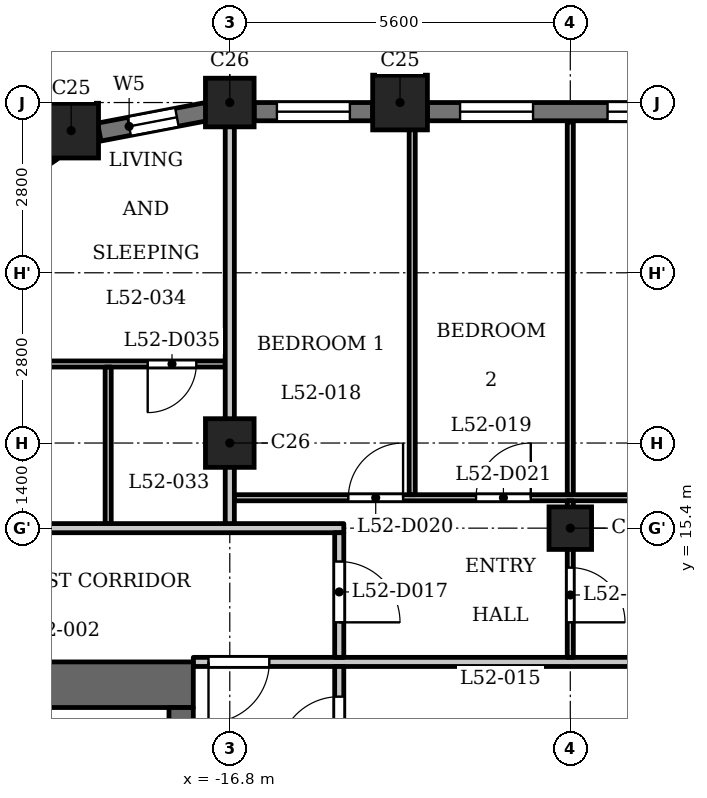
"""IFC4 building model, lengths in metres.
Left out: names, types, materials, properties, quantities, classifications, styles, units other than length and angle.
Written with IfcOpenShell. Run it as: python <this file> out.ifc"""

import sys

from ifc_helpers import new_model, si_unit, direction, frame, frame_2d, origin, origin_2d, place, context, subcontext, project, spatial, rectangle, extrude, element, fill, save


model = new_model("IFC4")
c1 = context("Model", 3, precision=1e-05, world=origin(), true_north=direction((0.0, 1.0)))
c2 = subcontext(c1, "Body", "Model", "MODEL_VIEW")
j1 = project(units=[si_unit("LENGTHUNIT", "METRE"), si_unit("PLANEANGLEUNIT", "RADIAN")], contexts=[c1])
p1 = place(None, origin())
s1 = spatial("IfcSite", under=j1, at=p1, CompositionType="ELEMENT")
p2 = place(p1, origin())
s2 = spatial("IfcBuilding", under=s1, at=p2, CompositionType="ELEMENT")
p3 = place(p2, frame((0.0, 0.0, 202.9)))
s3 = spatial("IfcBuildingStorey", under=s2, at=p3, CompositionType="ELEMENT", Elevation=202.9)
for number, where, z_axis, x_axis in (
    (1, (-14.0, 22.4, 0.0), (0.0, 0.0, 1.0), (1.0, 0.0, 0.0)),
    (2, (-19.409, 21.938, 0.0), (0.0, 0.0, 1.0), (1.0, 0.0, 0.0)),
):
    element("IfcColumn", number, at=place(p3, frame(where, z_axis=z_axis, x_axis=x_axis)), inside=s3, PredefinedType="COLUMN", context=c2, shape_type="SweptSolid", body=[
        extrude(rectangle(XDim=0.9, YDim=0.9, at=origin_2d()), origin(), (0.0, 0.0, 1.0), 3.5),
    ])
for number, where, z_axis, x_axis in (
    (3, (-16.8, 16.8, 0.0), (0.0, 0.0, 1.0), (1.0, 0.0, 0.0)),
    (4, (-16.8, 22.4, 0.0), (0.0, 0.0, 1.0), (1.0, 0.0, 0.0)),
):
    element("IfcColumn", number, at=place(p3, frame(where, z_axis=z_axis, x_axis=x_axis)), inside=s3, PredefinedType="COLUMN", context=c2, shape_type="SweptSolid", body=[
        extrude(rectangle(XDim=0.8, YDim=0.8, at=origin_2d()), origin(), (0.0, 0.0, 1.0), 3.5),
    ])
p4 = place(p3, frame((-11.2, 15.4, 0.0), z_axis=(0.0, 0.0, 1.0), x_axis=(1.0, 0.0, 0.0)))
e5 = element("IfcColumn", 5, at=p4, inside=s3, PredefinedType="COLUMN", context=c2, shape_type="SweptSolid", body=[
    extrude(rectangle(XDim=0.7, YDim=0.7, at=origin_2d()), origin(), (0.0, 0.0, 1.0), 3.5),
])
p5 = place(p3, frame((-8.85, 22.25, 0.0), z_axis=(0.0, 0.0, 1.0), x_axis=(-1.0, 0.0, 0.0)))
e6 = element("IfcWall", 6, at=p5, inside=s3, PredefinedType="SOLIDWALL", context=c2, shape_type="SweptSolid", body=[
    extrude(rectangle(XDim=4.7, YDim=0.3, at=frame_2d((2.35, 0.0))), origin(), (0.0, 0.0, 1.0), 2.5),
])
p6 = place(p5, frame((0.538, 0.0, 0.6)))
e7 = element("IfcOpeningElement", 7, at=p6, cuts=e6, PredefinedType="OPENING", context=c2, shape_type="SweptSolid", body=[
    extrude(rectangle(XDim=1.2, YDim=1.55, at=frame_2d((0.6, 0.775))), frame((0.0, 0.16, 0.0), z_axis=(0.0, -1.0, 0.0), x_axis=(1.0, 0.0, 0.0)), (0.0, 0.0, 1.0), 0.32),
])
p7 = place(p5, frame((2.962, 0.0, 0.6)))
e8 = element("IfcOpeningElement", 8, at=p7, cuts=e6, PredefinedType="OPENING", context=c2, shape_type="SweptSolid", body=[
    extrude(rectangle(XDim=1.2, YDim=1.55, at=frame_2d((0.6, 0.775))), frame((0.0, 0.16, 0.0), z_axis=(0.0, -1.0, 0.0), x_axis=(1.0, 0.0, 0.0)), (0.0, 0.0, 1.0), 0.32),
])
p8 = place(p3, frame((-14.45, 22.25, 0.0), z_axis=(0.0, 0.0, 1.0), x_axis=(-1.0, 0.0, 0.0)))
e9 = element("IfcWall", 9, at=p8, inside=s3, PredefinedType="SOLIDWALL", context=c2, shape_type="SweptSolid", body=[
    extrude(rectangle(XDim=1.95, YDim=0.3, at=frame_2d((0.975, 0.0))), origin(), (0.0, 0.0, 1.0), 2.5),
])
p9 = place(p8, frame((0.375, 0.0, 0.6)))
e10 = element("IfcOpeningElement", 10, at=p9, cuts=e9, PredefinedType="OPENING", context=c2, shape_type="SweptSolid", body=[
    extrude(rectangle(XDim=1.2, YDim=1.55, at=frame_2d((0.6, 0.775))), frame((0.0, 0.16, 0.0), z_axis=(0.0, -1.0, 0.0), x_axis=(1.0, 0.0, 0.0)), (0.0, 0.0, 1.0), 0.32),
])
p10 = place(p3, frame((-17.179, 22.251, 0.0), z_axis=(0.0, 0.0, 1.0), x_axis=(-0.98230529033, -0.187286722942, 0.0)))
e11 = element("IfcWall", 11, at=p10, inside=s3, PredefinedType="SOLIDWALL", context=c2, shape_type="SweptSolid", body=[
    extrude(rectangle(XDim=1.799, YDim=0.3, at=frame_2d((0.899, 0.0))), origin(), (0.0, 0.0, 1.0), 2.5),
])
p11 = place(p10, frame((0.5, 0.0, 0.6)))
e12 = element("IfcOpeningElement", 12, at=p11, cuts=e11, PredefinedType="OPENING", context=c2, shape_type="SweptSolid", body=[
    extrude(rectangle(XDim=0.8, YDim=1.55, at=frame_2d((0.4, 0.775))), frame((0.0, 0.16, 0.0), z_axis=(0.0, -1.0, 0.0), x_axis=(1.0, 0.0, 0.0)), (0.0, 0.0, 1.0), 0.32),
])
p12 = place(p3, frame((-19.719, 21.594, 0.0), z_axis=(0.0, 0.0, 1.0), x_axis=(-0.827067282455, -0.562102935673, 0.0)))
e13 = element("IfcWall", 13, at=p12, inside=s3, PredefinedType="SOLIDWALL", context=c2, shape_type="SweptSolid", body=[
    extrude(rectangle(XDim=1.806, YDim=0.3, at=frame_2d((0.903, 0.0))), origin(), (0.0, 0.0, 1.0), 2.5),
])
p13 = place(p12, frame((0.503, 0.0, 0.6)))
e14 = element("IfcOpeningElement", 14, at=p13, cuts=e13, PredefinedType="OPENING", context=c2, shape_type="SweptSolid", body=[
    extrude(rectangle(XDim=0.8, YDim=1.55, at=frame_2d((0.4, 0.775))), frame((0.0, 0.16, 0.0), z_axis=(0.0, -1.0, 0.0), x_axis=(1.0, 0.0, 0.0)), (0.0, 0.0, 1.0), 0.32),
])
p14 = place(p3, frame((-17.4, 12.825, 0.0), z_axis=(0.0, 0.0, 1.0), x_axis=(-1.0, 0.0, 0.0)))
e15 = element("IfcWall", 15, at=p14, inside=s3, PredefinedType="SHEAR", context=c2, shape_type="SweptSolid", body=[
    extrude(rectangle(XDim=7.6, YDim=0.75, at=frame_2d((3.8, 0.0))), origin(), (0.0, 0.0, 1.0), 3.2),
])
p15 = place(p3, frame((-17.6, -12.45, 0.0), z_axis=(0.0, 0.0, 1.0), x_axis=(0.0, 1.0, 0.0)))
e16 = element("IfcWall", 16, at=p15, inside=s3, PredefinedType="SHEAR", context=c2, shape_type="SweptSolid", body=[
    extrude(rectangle(XDim=24.9, YDim=0.4, at=frame_2d((12.45, 0.0))), origin(), (0.0, 0.0, 1.0), 3.2),
])
p16 = place(p15, frame((8.65, 0.0, 0.0)))
e17 = element("IfcOpeningElement", 17, at=p16, cuts=e16, PredefinedType="OPENING", context=c2, shape_type="SweptSolid", body=[
    extrude(rectangle(XDim=0.9, YDim=2.1, at=frame_2d((0.45, 1.05))), frame((0.0, 0.21, 0.0), z_axis=(0.0, -1.0, 0.0), x_axis=(1.0, 0.0, 0.0)), (0.0, 0.0, 1.0), 0.42),
])
p17 = place(p15, frame((15.6, 0.0, 0.0)))
e18 = element("IfcOpeningElement", 18, at=p17, cuts=e16, PredefinedType="OPENING", context=c2, shape_type="SweptSolid", body=[
    extrude(rectangle(XDim=1.1, YDim=2.1, at=frame_2d((0.55, 1.05))), frame((0.0, 0.21, 0.0), z_axis=(0.0, -1.0, 0.0), x_axis=(1.0, 0.0, 0.0)), (0.0, 0.0, 1.0), 0.42),
])
p18 = place(p15, frame((18.0, 0.0, 0.0)))
e19 = element("IfcOpeningElement", 19, at=p18, cuts=e16, PredefinedType="OPENING", context=c2, shape_type="SweptSolid", body=[
    extrude(rectangle(XDim=1.1, YDim=2.1, at=frame_2d((0.55, 1.05))), frame((0.0, 0.21, 0.0), z_axis=(0.0, -1.0, 0.0), x_axis=(1.0, 0.0, 0.0)), (0.0, 0.0, 1.0), 0.42),
])
p19 = place(p15, frame((23.025, 0.0, 0.0)))
e20 = element("IfcOpeningElement", 20, at=p19, cuts=e16, PredefinedType="OPENING", context=c2, shape_type="SweptSolid", body=[
    extrude(rectangle(XDim=1.1, YDim=2.1, at=frame_2d((0.55, 1.05))), frame((0.0, 0.21, 0.0), z_axis=(0.0, -1.0, 0.0), x_axis=(1.0, 0.0, 0.0)), (0.0, 0.0, 1.0), 0.42),
])
p20 = place(p15, frame((0.775, 0.0, 0.0)))
e21 = element("IfcOpeningElement", 21, at=p20, cuts=e16, PredefinedType="OPENING", context=c2, shape_type="SweptSolid", body=[
    extrude(rectangle(XDim=1.1, YDim=2.1, at=frame_2d((0.55, 1.05))), frame((0.0, 0.21, 0.0), z_axis=(0.0, -1.0, 0.0), x_axis=(1.0, 0.0, 0.0)), (0.0, 0.0, 1.0), 0.42),
])
p21 = place(p15, frame((12.925, 0.0, 0.0)))
e22 = element("IfcOpeningElement", 22, at=p21, cuts=e16, PredefinedType="OPENING", context=c2, shape_type="SweptSolid", body=[
    extrude(rectangle(XDim=1.8, YDim=2.1, at=frame_2d((0.9, 1.05))), frame((0.0, 0.21, 0.0), z_axis=(0.0, -1.0, 0.0), x_axis=(1.0, 0.0, 0.0)), (0.0, 0.0, 1.0), 0.42),
])
p22 = place(p3, frame((-17.4, 13.2, 0.0), z_axis=(0.0, 0.0, 1.0), x_axis=(1.0, 0.0, 0.0)))
e23 = element("IfcWall", 23, at=p22, inside=s3, PredefinedType="PARTITIONING", context=c2, shape_type="SweptSolid", body=[
    extrude(rectangle(XDim=34.8, YDim=0.15, at=frame_2d((17.4, 0.0))), origin(), (0.0, 0.0, 1.0), 3.2),
])
p23 = place(p22, frame((0.25, 0.0, 0.0)))
e24 = element("IfcOpeningElement", 24, at=p23, cuts=e23, PredefinedType="OPENING", context=c2, shape_type="SweptSolid", body=[
    extrude(rectangle(XDim=1.0, YDim=2.1, at=frame_2d((0.5, 1.05))), frame((0.0, 0.085, 0.0), z_axis=(0.0, -1.0, 0.0), x_axis=(1.0, 0.0, 0.0)), (0.0, 0.0, 1.0), 0.17),
])
p24 = place(p22, frame((33.65, 0.0, 0.0)))
e25 = element("IfcOpeningElement", 25, at=p24, cuts=e23, PredefinedType="OPENING", context=c2, shape_type="SweptSolid", body=[
    extrude(rectangle(XDim=1.0, YDim=2.1, at=frame_2d((0.5, 1.05))), frame((0.0, 0.085, 0.0), z_axis=(0.0, -1.0, 0.0), x_axis=(1.0, 0.0, 0.0)), (0.0, 0.0, 1.0), 0.17),
])
p25 = place(p3, frame((-24.684, 15.4, 0.0), z_axis=(0.0, 0.0, 1.0), x_axis=(1.0, 0.0, 0.0)))
e26 = element("IfcWall", 26, at=p25, inside=s3, PredefinedType="PARTITIONING", context=c2, shape_type="SweptSolid", body=[
    extrude(rectangle(XDim=9.759, YDim=0.15, at=frame_2d((4.879, 0.0))), origin(), (0.0, 0.0, 1.0), 3.2),
])
p26 = place(p25, frame((0.984, 0.0, 0.0)))
e27 = element("IfcOpeningElement", 27, at=p26, cuts=e26, PredefinedType="OPENING", context=c2, shape_type="SweptSolid", body=[
    extrude(rectangle(XDim=1.0, YDim=2.1, at=frame_2d((0.5, 1.05))), frame((0.0, 0.085, 0.0), z_axis=(0.0, -1.0, 0.0), x_axis=(1.0, 0.0, 0.0)), (0.0, 0.0, 1.0), 0.17),
])
p27 = place(p3, frame((-16.725, 15.9, 0.0), z_axis=(0.0, 0.0, 1.0), x_axis=(1.0, 0.0, 0.0)))
e28 = element("IfcWall", 28, at=p27, inside=s3, PredefinedType="PARTITIONING", context=c2, shape_type="SweptSolid", body=[
    extrude(rectangle(XDim=33.45, YDim=0.1, at=frame_2d((16.725, 0.0))), origin(), (0.0, 0.0, 1.0), 3.2),
])
p28 = place(p27, frame((1.875, 0.0, 0.0)))
e29 = element("IfcOpeningElement", 29, at=p28, cuts=e28, PredefinedType="OPENING", context=c2, shape_type="SweptSolid", body=[
    extrude(rectangle(XDim=0.9, YDim=2.1, at=frame_2d((0.45, 1.05))), frame((0.0, 0.06, 0.0), z_axis=(0.0, -1.0, 0.0), x_axis=(1.0, 0.0, 0.0)), (0.0, 0.0, 1.0), 0.12),
])
p29 = place(p27, frame((3.975, 0.0, 0.0)))
e30 = element("IfcOpeningElement", 30, at=p29, cuts=e28, PredefinedType="OPENING", context=c2, shape_type="SweptSolid", body=[
    extrude(rectangle(XDim=0.9, YDim=2.1, at=frame_2d((0.45, 1.05))), frame((0.0, 0.06, 0.0), z_axis=(0.0, -1.0, 0.0), x_axis=(1.0, 0.0, 0.0)), (0.0, 0.0, 1.0), 0.12),
])
p30 = place(p27, frame((6.825, 0.0, 0.0)))
e31 = element("IfcOpeningElement", 31, at=p30, cuts=e28, PredefinedType="OPENING", context=c2, shape_type="SweptSolid", body=[
    extrude(rectangle(XDim=0.9, YDim=2.1, at=frame_2d((0.45, 1.05))), frame((0.0, 0.06, 0.0), z_axis=(0.0, -1.0, 0.0), x_axis=(1.0, 0.0, 0.0)), (0.0, 0.0, 1.0), 0.12),
])
p31 = place(p27, frame((28.975, 0.0, 0.0)))
e32 = element("IfcOpeningElement", 32, at=p31, cuts=e28, PredefinedType="OPENING", context=c2, shape_type="SweptSolid", body=[
    extrude(rectangle(XDim=0.9, YDim=2.1, at=frame_2d((0.45, 1.05))), frame((0.0, 0.06, 0.0), z_axis=(0.0, -1.0, 0.0), x_axis=(1.0, 0.0, 0.0)), (0.0, 0.0, 1.0), 0.12),
])
p32 = place(p27, frame((30.725, 0.0, 0.0)))
e33 = element("IfcOpeningElement", 33, at=p32, cuts=e28, PredefinedType="OPENING", context=c2, shape_type="SweptSolid", body=[
    extrude(rectangle(XDim=0.9, YDim=2.1, at=frame_2d((0.45, 1.05))), frame((0.0, 0.06, 0.0), z_axis=(0.0, -1.0, 0.0), x_axis=(1.0, 0.0, 0.0)), (0.0, 0.0, 1.0), 0.12),
])
p33 = place(p27, frame((25.625, 0.0, 0.0)))
e34 = element("IfcOpeningElement", 34, at=p33, cuts=e28, PredefinedType="OPENING", context=c2, shape_type="SweptSolid", body=[
    extrude(rectangle(XDim=0.9, YDim=2.1, at=frame_2d((0.45, 1.05))), frame((0.0, 0.06, 0.0), z_axis=(0.0, -1.0, 0.0), x_axis=(1.0, 0.0, 0.0)), (0.0, 0.0, 1.0), 0.12),
])
p34 = place(p3, frame((-23.64, 18.1, 0.0), z_axis=(0.0, 0.0, 1.0), x_axis=(1.0, 0.0, 0.0)))
e35 = element("IfcWall", 35, at=p34, inside=s3, PredefinedType="PARTITIONING", context=c2, shape_type="SweptSolid", body=[
    extrude(rectangle(XDim=6.765, YDim=0.1, at=frame_2d((3.382, 0.0))), origin(), (0.0, 0.0, 1.0), 3.2),
])
p35 = place(p34, frame((5.49, 0.0, 0.0)))
e36 = element("IfcOpeningElement", 36, at=p35, cuts=e35, PredefinedType="OPENING", context=c2, shape_type="SweptSolid", body=[
    extrude(rectangle(XDim=0.8, YDim=2.1, at=frame_2d((0.4, 1.05))), frame((0.0, 0.06, 0.0), z_axis=(0.0, -1.0, 0.0), x_axis=(1.0, 0.0, 0.0)), (0.0, 0.0, 1.0), 0.12),
])
p36 = place(p34, frame((1.29, 0.0, 0.0)))
e37 = element("IfcOpeningElement", 37, at=p36, cuts=e35, PredefinedType="OPENING", context=c2, shape_type="SweptSolid", body=[
    extrude(rectangle(XDim=0.9, YDim=2.1, at=frame_2d((0.45, 1.05))), frame((0.0, 0.06, 0.0), z_axis=(0.0, -1.0, 0.0), x_axis=(1.0, 0.0, 0.0)), (0.0, 0.0, 1.0), 0.12),
])
p37 = place(p3, frame((-18.8, 15.475, 0.0), z_axis=(0.0, 0.0, 1.0), x_axis=(0.0, 1.0, 0.0)))
e38 = element("IfcWall", 38, at=p37, inside=s3, PredefinedType="PARTITIONING", context=c2, shape_type="SweptSolid", body=[
    extrude(rectangle(XDim=2.575, YDim=0.1, at=frame_2d((1.288, 0.0))), origin(), (0.0, 0.0, 1.0), 3.2),
])
p38 = place(p3, frame((-16.8, 15.475, 0.0), z_axis=(0.0, 0.0, 1.0), x_axis=(0.0, 1.0, 0.0)))
e39 = element("IfcWall", 39, at=p38, inside=s3, PredefinedType="PARTITIONING", context=c2, shape_type="SweptSolid", body=[
    extrude(rectangle(XDim=6.835, YDim=0.15, at=frame_2d((3.417, 0.0))), origin(), (0.0, 0.0, 1.0), 2.55),
])
p39 = place(p3, frame((-15.0, 6.769, 0.0), z_axis=(0.0, 0.0, 1.0), x_axis=(0.0, 1.0, 0.0)))
e40 = element("IfcWall", 40, at=p39, inside=s3, PredefinedType="PARTITIONING", context=c2, shape_type="SweptSolid", body=[
    extrude(rectangle(XDim=6.356, YDim=0.15, at=frame_2d((3.178, 0.0))), origin(), (0.0, 0.0, 1.0), 3.2),
])
p40 = place(p39, frame((4.86, 0.0, 0.0)))
e41 = element("IfcOpeningElement", 41, at=p40, cuts=e40, PredefinedType="OPENING", context=c2, shape_type="SweptSolid", body=[
    extrude(rectangle(XDim=1.0, YDim=2.1, at=frame_2d((0.5, 1.05))), frame((0.0, 0.085, 0.0), z_axis=(0.0, -1.0, 0.0), x_axis=(1.0, 0.0, 0.0)), (0.0, 0.0, 1.0), 0.17),
])
p41 = place(p3, frame((-15.0, 13.275, 0.0), z_axis=(0.0, 0.0, 1.0), x_axis=(0.0, 1.0, 0.0)))
e42 = element("IfcWall", 42, at=p41, inside=s3, PredefinedType="PARTITIONING", context=c2, shape_type="SweptSolid", body=[
    extrude(rectangle(XDim=2.05, YDim=0.15, at=frame_2d((1.025, 0.0))), origin(), (0.0, 0.0, 1.0), 3.2),
])
p42 = place(p41, frame((0.576, 0.0, 0.0)))
e43 = element("IfcOpeningElement", 43, at=p42, cuts=e42, PredefinedType="OPENING", context=c2, shape_type="SweptSolid", body=[
    extrude(rectangle(XDim=1.0, YDim=2.1, at=frame_2d((0.5, 1.05))), frame((0.0, 0.085, 0.0), z_axis=(0.0, -1.0, 0.0), x_axis=(1.0, 0.0, 0.0)), (0.0, 0.0, 1.0), 0.17),
])
p43 = place(p3, frame((-13.8, 15.95, 0.0), z_axis=(0.0, 0.0, 1.0), x_axis=(0.0, 1.0, 0.0)))
e44 = element("IfcWall", 44, at=p43, inside=s3, PredefinedType="PARTITIONING", context=c2, shape_type="SweptSolid", body=[
    extrude(rectangle(XDim=6.88, YDim=0.1, at=frame_2d((3.44, 0.0))), origin(), (0.0, 0.0, 1.0), 3.2),
])
p44 = place(p3, frame((-11.2, 13.275, 0.0), z_axis=(0.0, 0.0, 1.0), x_axis=(0.0, 1.0, 0.0)))
e45 = element("IfcWall", 45, at=p44, inside=s3, PredefinedType="PARTITIONING", context=c2, shape_type="SweptSolid", body=[
    extrude(rectangle(XDim=2.575, YDim=0.1, at=frame_2d((1.288, 0.0))), origin(), (0.0, 0.0, 1.0), 3.2),
])
p45 = place(p44, frame((0.576, 0.0, 0.0)))
e46 = element("IfcOpeningElement", 46, at=p45, cuts=e45, PredefinedType="OPENING", context=c2, shape_type="SweptSolid", body=[
    extrude(rectangle(XDim=0.9, YDim=2.1, at=frame_2d((0.45, 1.05))), frame((0.0, 0.06, 0.0), z_axis=(0.0, -1.0, 0.0), x_axis=(1.0, 0.0, 0.0)), (0.0, 0.0, 1.0), 0.12),
])
p46 = place(p3, frame((-11.2, 15.95, 0.0), z_axis=(0.0, 0.0, 1.0), x_axis=(0.0, 1.0, 0.0)))
e47 = element("IfcWall", 47, at=p46, inside=s3, PredefinedType="PARTITIONING", context=c2, shape_type="SweptSolid", body=[
    extrude(rectangle(XDim=6.13, YDim=0.1, at=frame_2d((3.065, 0.0))), origin(), (0.0, 0.0, 1.0), 3.2),
])
p47 = place(p40, origin())
e48 = element("IfcDoor", 48, at=p47, inside=s3, OperationType="SINGLE_SWING_RIGHT", PredefinedType="DOOR", context=c2, shape_type="SweptSolid", body=[
    extrude(rectangle(XDim=1.0, YDim=2.1, at=frame_2d((0.5, 1.05))), frame((0.0, 0.025, 0.0), z_axis=(0.0, -1.0, 0.0), x_axis=(1.0, 0.0, 0.0)), (0.0, 0.0, 1.0), 0.05),
])
fill(e41, e48)
p48 = place(p23, origin())
e49 = element("IfcDoor", 49, at=p48, inside=s3, OperationType="SINGLE_SWING_LEFT", PredefinedType="DOOR", context=c2, shape_type="SweptSolid", body=[
    extrude(rectangle(XDim=1.0, YDim=2.1, at=frame_2d((0.5, 1.05))), frame((0.0, 0.025, 0.0), z_axis=(0.0, -1.0, 0.0), x_axis=(1.0, 0.0, 0.0)), (0.0, 0.0, 1.0), 0.05),
])
fill(e24, e49)
p49 = place(p42, origin())
e50 = element("IfcDoor", 50, at=p49, inside=s3, OperationType="SINGLE_SWING_LEFT", PredefinedType="DOOR", context=c2, shape_type="SweptSolid", body=[
    extrude(rectangle(XDim=1.0, YDim=2.1, at=frame_2d((0.5, 1.05))), frame((0.0, 0.025, 0.0), z_axis=(0.0, -1.0, 0.0), x_axis=(1.0, 0.0, 0.0)), (0.0, 0.0, 1.0), 0.05),
])
fill(e43, e50)
p50 = place(p45, origin())
e51 = element("IfcDoor", 51, at=p50, inside=s3, OperationType="SINGLE_SWING_LEFT", PredefinedType="DOOR", context=c2, shape_type="SweptSolid", body=[
    extrude(rectangle(XDim=0.9, YDim=2.1, at=frame_2d((0.45, 1.05))), frame((0.0, 0.025, 0.0), z_axis=(0.0, -1.0, 0.0), x_axis=(1.0, 0.0, 0.0)), (0.0, 0.0, 1.0), 0.05),
])
fill(e46, e51)
p51 = place(p28, origin())
e52 = element("IfcDoor", 52, at=p51, inside=s3, OperationType="SINGLE_SWING_LEFT", PredefinedType="DOOR", context=c2, shape_type="SweptSolid", body=[
    extrude(rectangle(XDim=0.9, YDim=2.1, at=frame_2d((0.45, 1.05))), frame((0.0, 0.025, 0.0), z_axis=(0.0, -1.0, 0.0), x_axis=(1.0, 0.0, 0.0)), (0.0, 0.0, 1.0), 0.05),
])
fill(e29, e52)
p52 = place(p29, origin())
e53 = element("IfcDoor", 53, at=p52, inside=s3, OperationType="SINGLE_SWING_LEFT", PredefinedType="DOOR", context=c2, shape_type="SweptSolid", body=[
    extrude(rectangle(XDim=0.9, YDim=2.1, at=frame_2d((0.45, 1.05))), frame((0.0, 0.025, 0.0), z_axis=(0.0, -1.0, 0.0), x_axis=(1.0, 0.0, 0.0)), (0.0, 0.0, 1.0), 0.05),
])
fill(e30, e53)
p53 = place(p35, origin())
e54 = element("IfcDoor", 54, at=p53, inside=s3, OperationType="SINGLE_SWING_LEFT", PredefinedType="DOOR", context=c2, shape_type="SweptSolid", body=[
    extrude(rectangle(XDim=0.8, YDim=2.1, at=frame_2d((0.4, 1.05))), frame((0.0, 0.025, 0.0), z_axis=(0.0, -1.0, 0.0), x_axis=(1.0, 0.0, 0.0)), (0.0, 0.0, 1.0), 0.05),
])
fill(e36, e54)
p54 = place(p6, origin())
e55 = element("IfcWindow", 55, at=p54, inside=s3, PartitioningType="SINGLE_PANEL", PredefinedType="WINDOW", context=c2, shape_type="SweptSolid", body=[
    extrude(rectangle(XDim=1.2, YDim=1.55, at=frame_2d((0.6, 0.775))), frame((0.0, 0.03, 0.0), z_axis=(0.0, -1.0, 0.0), x_axis=(1.0, 0.0, 0.0)), (0.0, 0.0, 1.0), 0.06),
])
fill(e7, e55)
p55 = place(p7, origin())
e56 = element("IfcWindow", 56, at=p55, inside=s3, PartitioningType="SINGLE_PANEL", PredefinedType="WINDOW", context=c2, shape_type="SweptSolid", body=[
    extrude(rectangle(XDim=1.2, YDim=1.55, at=frame_2d((0.6, 0.775))), frame((0.0, 0.03, 0.0), z_axis=(0.0, -1.0, 0.0), x_axis=(1.0, 0.0, 0.0)), (0.0, 0.0, 1.0), 0.06),
])
fill(e8, e56)
p56 = place(p9, origin())
e57 = element("IfcWindow", 57, at=p56, inside=s3, PartitioningType="SINGLE_PANEL", PredefinedType="WINDOW", context=c2, shape_type="SweptSolid", body=[
    extrude(rectangle(XDim=1.2, YDim=1.55, at=frame_2d((0.6, 0.775))), frame((0.0, 0.03, 0.0), z_axis=(0.0, -1.0, 0.0), x_axis=(1.0, 0.0, 0.0)), (0.0, 0.0, 1.0), 0.06),
])
fill(e10, e57)
p57 = place(p11, origin())
e58 = element("IfcWindow", 58, at=p57, inside=s3, PartitioningType="SINGLE_PANEL", PredefinedType="WINDOW", context=c2, shape_type="SweptSolid", body=[
    extrude(rectangle(XDim=0.8, YDim=1.55, at=frame_2d((0.4, 0.775))), frame((0.0, 0.03, 0.0), z_axis=(0.0, -1.0, 0.0), x_axis=(1.0, 0.0, 0.0)), (0.0, 0.0, 1.0), 0.06),
])
fill(e12, e58)
save(model, sys.argv[1])
